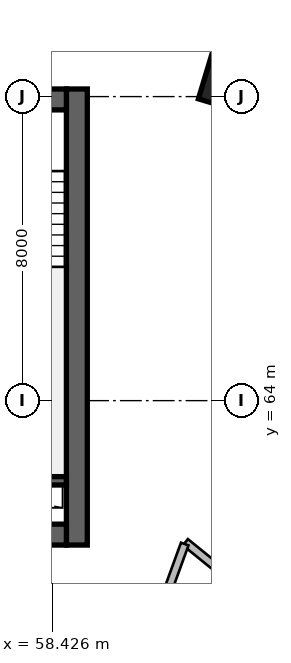
"""IFC4 building model, lengths in metres.
Left out: names, types, materials, properties, quantities, classifications, styles, units other than length and angle.
Written with IfcOpenShell. Run it as: python <this file> out.ifc"""

import sys

from ifc_helpers import new_model, si_unit, direction, frame, frame_2d, origin, origin_2d, place, context, subcontext, project, spatial, rectangle, extrude, source, transform, mapped, element, save


model = new_model("IFC4")
c1 = context("Model", 3, precision=1e-05, world=origin(), true_north=direction((0.0, 1.0)))
c2 = subcontext(c1, "Body", "Model", "MODEL_VIEW")
j1 = project(units=[si_unit("LENGTHUNIT", "METRE"), si_unit("PLANEANGLEUNIT", "RADIAN")], contexts=[c1])
p1 = place(None, origin())
s1 = spatial("IfcSite", under=j1, at=p1, CompositionType="ELEMENT")
p2 = place(p1, origin())
s2 = spatial("IfcBuilding", under=s1, at=p2, CompositionType="ELEMENT")
p3 = place(p2, frame((0.0, 0.0, 71.4)))
s3 = spatial("IfcBuildingStorey", under=s2, at=p3, CompositionType="ELEMENT", Elevation=71.4)
m1 = source(origin(), c2, "Body", "SweptSolid", [
    extrude(rectangle(XDim=12.0, YDim=0.55, at=frame_2d((6.0, 0.0))), origin(), (0.0, 0.0, 1.0), 3.6),
])
p4 = place(p3, frame((59.075, 60.2, 0.0), z_axis=(0.0, 0.0, 1.0), x_axis=(0.0, 1.0, 0.0)))
e1 = element("IfcWall", 1, at=p4, inside=s3, PredefinedType="SHEAR", context=c2, shape_type="MappedRepresentation", body=[
    mapped(m1, transform((0.0, 0.0, 0.0), scale=1.0)),
])
m2 = source(origin(), c2, "Body", "SweptSolid", [
    extrude(rectangle(XDim=21.6, YDim=0.55, at=frame_2d((10.8, 0.0))), origin(), (0.0, 0.0, 1.0), 3.6),
])
p5 = place(p3, frame((37.2, 60.475, 0.0), z_axis=(0.0, 0.0, 1.0), x_axis=(1.0, 0.0, 0.0)))
e2 = element("IfcWall", 2, at=p5, inside=s3, PredefinedType="SHEAR", context=c2, shape_type="MappedRepresentation", body=[
    mapped(m2, transform((0.0, 0.0, 0.0), scale=1.0)),
])
p6 = place(p5, frame((1.1, 0.0, 0.0)))
e3 = element("IfcOpeningElement", 3, at=p6, cuts=e2, PredefinedType="OPENING", context=c2, shape_type="SweptSolid", body=[
    extrude(rectangle(XDim=1.15, YDim=2.15, at=frame_2d((0.575, 1.075))), frame((0.0, 0.285, 0.0), z_axis=(0.0, -1.0, 0.0), x_axis=(1.0, 0.0, 0.0)), (0.0, 0.0, 1.0), 0.57),
])
p7 = place(p5, frame((19.5, 0.0, 0.0)))
e4 = element("IfcOpeningElement", 4, at=p7, cuts=e2, PredefinedType="OPENING", context=c2, shape_type="SweptSolid", body=[
    extrude(rectangle(XDim=0.9, YDim=2.1, at=frame_2d((0.45, 1.05))), frame((0.0, 0.285, 0.0), z_axis=(0.0, -1.0, 0.0), x_axis=(1.0, 0.0, 0.0)), (0.0, 0.0, 1.0), 0.57),
])
p8 = place(p5, frame((12.02, 0.0, 0.0)))
e5 = element("IfcOpeningElement", 5, at=p8, cuts=e2, PredefinedType="OPENING", context=c2, shape_type="SweptSolid", body=[
    extrude(rectangle(XDim=1.6, YDim=2.15, at=frame_2d((0.8, 1.075))), frame((0.0, 0.285, 0.0), z_axis=(0.0, -1.0, 0.0), x_axis=(1.0, 0.0, 0.0)), (0.0, 0.0, 1.0), 0.57),
])
p9 = place(p3, frame((37.2, 71.925, 0.0), z_axis=(0.0, 0.0, 1.0), x_axis=(1.0, 0.0, 0.0)))
e6 = element("IfcWall", 6, at=p9, inside=s3, PredefinedType="SHEAR", context=c2, shape_type="MappedRepresentation", body=[
    mapped(m2, transform((0.0, 0.0, 0.0), scale=1.0)),
])
p10 = place(p9, frame((1.2, 0.0, 0.0)))
e7 = element("IfcOpeningElement", 7, at=p10, cuts=e6, PredefinedType="OPENING", context=c2, shape_type="SweptSolid", body=[
    extrude(rectangle(XDim=0.9, YDim=2.1, at=frame_2d((0.45, 1.05))), frame((0.0, 0.285, 0.0), z_axis=(0.0, -1.0, 0.0), x_axis=(1.0, 0.0, 0.0)), (0.0, 0.0, 1.0), 0.57),
])
p11 = place(p9, frame((14.7, 0.0, 0.0)))
e8 = element("IfcOpeningElement", 8, at=p11, cuts=e6, PredefinedType="OPENING", context=c2, shape_type="SweptSolid", body=[
    extrude(rectangle(XDim=1.2, YDim=2.15, at=frame_2d((0.6, 1.075))), frame((0.0, 0.285, 0.0), z_axis=(0.0, -1.0, 0.0), x_axis=(1.0, 0.0, 0.0)), (0.0, 0.0, 1.0), 0.57),
])
p12 = place(p9, frame((4.15, 0.0, 0.0)))
e9 = element("IfcOpeningElement", 9, at=p12, cuts=e6, PredefinedType="OPENING", context=c2, shape_type="SweptSolid", body=[
    extrude(rectangle(XDim=1.3, YDim=2.15, at=frame_2d((0.65, 1.075))), frame((0.0, 0.285, 0.0), z_axis=(0.0, -1.0, 0.0), x_axis=(1.0, 0.0, 0.0)), (0.0, 0.0, 1.0), 0.57),
])
p13 = place(p9, frame((7.25, 0.0, 0.0)))
e10 = element("IfcOpeningElement", 10, at=p13, cuts=e6, PredefinedType="OPENING", context=c2, shape_type="SweptSolid", body=[
    extrude(rectangle(XDim=0.9, YDim=2.1, at=frame_2d((0.45, 1.05))), frame((0.0, 0.285, 0.0), z_axis=(0.0, -1.0, 0.0), x_axis=(1.0, 0.0, 0.0)), (0.0, 0.0, 1.0), 0.57),
])
p14 = place(p9, frame((10.95, 0.0, 0.0)))
e11 = element("IfcOpeningElement", 11, at=p14, cuts=e6, PredefinedType="OPENING", context=c2, shape_type="SweptSolid", body=[
    extrude(rectangle(XDim=0.9, YDim=2.1, at=frame_2d((0.45, 1.05))), frame((0.0, 0.285, 0.0), z_axis=(0.0, -1.0, 0.0), x_axis=(1.0, 0.0, 0.0)), (0.0, 0.0, 1.0), 0.57),
])
m3 = source(origin(), c2, "Body", "SweptSolid", [
    extrude(rectangle(XDim=3.27, YDim=0.22, at=frame_2d((1.635, 0.0))), origin(), (0.0, 0.0, 1.0), 3.6),
])
p15 = place(p3, frame((55.53, 61.89, 0.0), z_axis=(0.0, 0.0, 1.0), x_axis=(1.0, 0.0, 0.0)))
e12 = element("IfcWall", 12, at=p15, inside=s3, PredefinedType="SHEAR", context=c2, shape_type="MappedRepresentation", body=[
    mapped(m3, transform((0.0, 0.0, 0.0), scale=1.0)),
])
m4 = source(origin(), c2, "Body", "SweptSolid", [
    extrude(rectangle(XDim=1.5, YDim=1.5, at=origin_2d()), origin(), (0.0, 0.0, 1.0), 3.6),
])
p16 = place(p3, frame((63.209, 72.442, 0.0), z_axis=(0.0, 0.0, 1.0), x_axis=(0.288697611798, 0.957420330337, 0.0)))
e13 = element("IfcColumn", 13, at=p16, inside=s3, PredefinedType="COLUMN", context=c2, shape_type="MappedRepresentation", body=[
    mapped(m4, transform((0.0, 0.0, 0.0), scale=1.0)),
])
m5 = source(origin(), c2, "Body", "SweptSolid", [
    extrude(rectangle(XDim=6.408, YDim=0.21, at=frame_2d((3.204, 0.0))), origin(), (0.0, 0.0, 1.0), 3.36),
])
p17 = place(p3, frame((61.931, 60.275, 0.0), z_axis=(0.0, 0.0, 1.0), x_axis=(0.775878552904, -0.630882295792, 0.0)))
e14 = element("IfcWall", 14, at=p17, inside=s3, PredefinedType="PARTITIONING", context=c2, shape_type="MappedRepresentation", body=[
    mapped(m5, transform((0.0, 0.0, 0.0), scale=1.0)),
])
p18 = place(p17, frame((1.063, 0.0, 0.0)))
e15 = element("IfcOpeningElement", 15, at=p18, cuts=e14, PredefinedType="OPENING", context=c2, shape_type="SweptSolid", body=[
    extrude(rectangle(XDim=0.95, YDim=2.15, at=frame_2d((0.475, 1.075))), frame((0.0, 0.115, 0.0), z_axis=(0.0, -1.0, 0.0), x_axis=(1.0, 0.0, 0.0)), (0.0, 0.0, 1.0), 0.23),
])
m6 = source(origin(), c2, "Body", "SweptSolid", [
    extrude(rectangle(XDim=12.196, YDim=0.21, at=frame_2d((6.098, 0.0))), origin(), (0.0, 0.0, 1.0), 3.36),
])
p19 = place(p3, frame((57.742, 48.766, 0.0), z_axis=(0.0, 0.0, 1.0), x_axis=(0.342022711534, 0.939691686031, 0.0)))
e16 = element("IfcWall", 16, at=p19, inside=s3, PredefinedType="PARTITIONING", context=c2, shape_type="MappedRepresentation", body=[
    mapped(m6, transform((0.0, 0.0, 0.0), scale=1.0)),
])
save(model, sys.argv[1])
